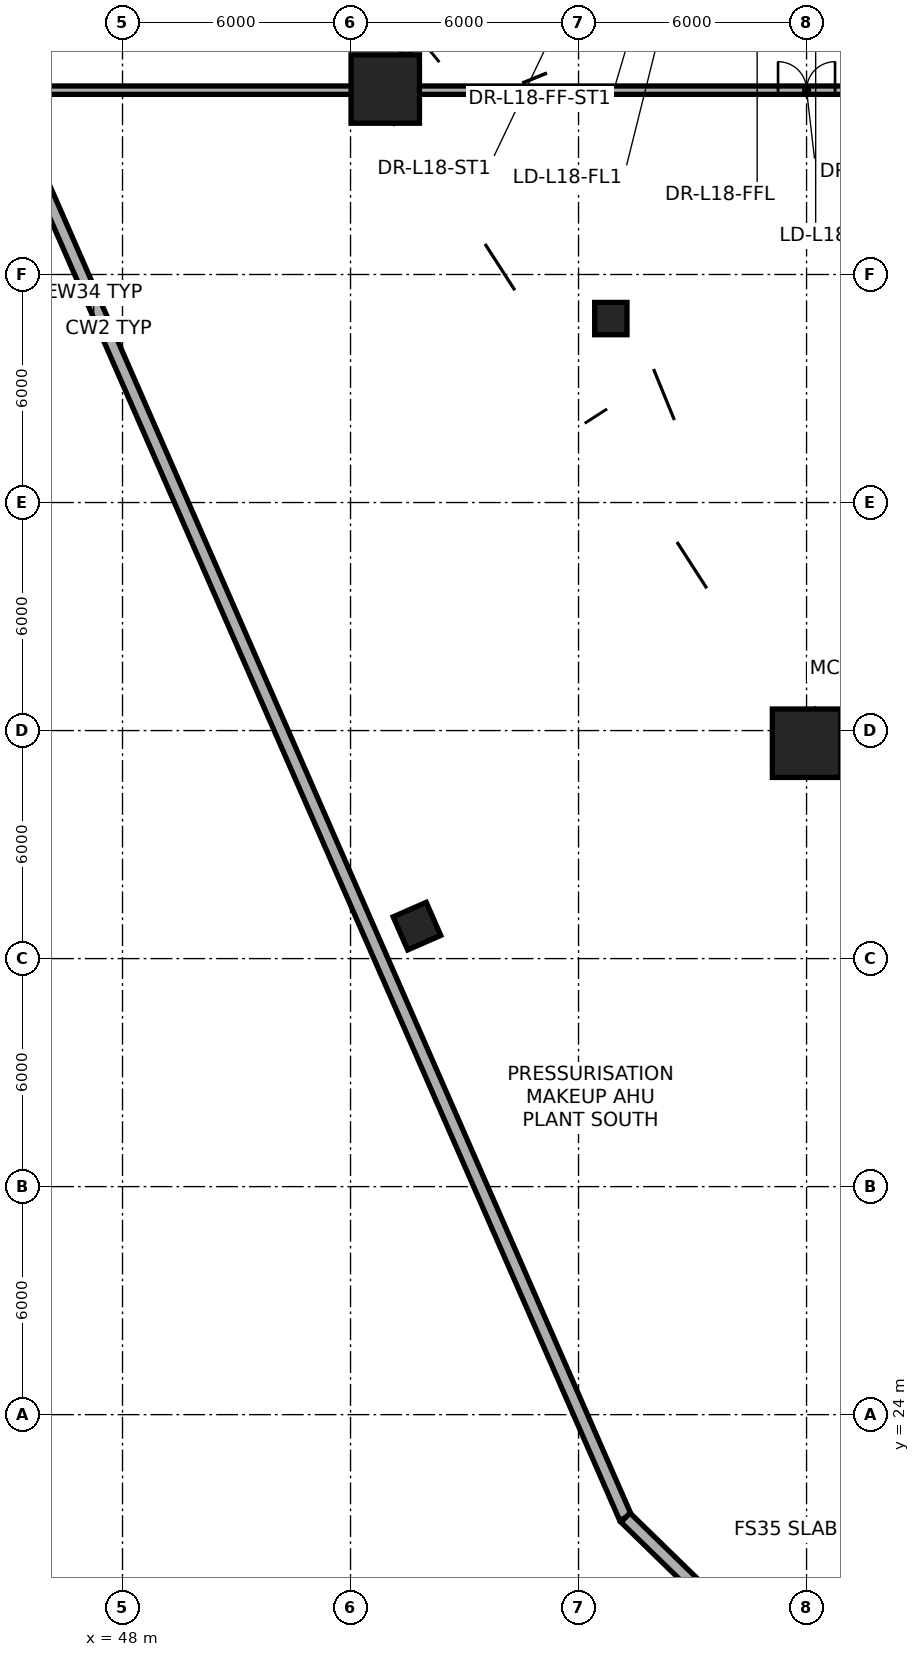
"""IFC4 building model, lengths in metres.
Left out: names, types, materials, properties, quantities, classifications, styles, units other than length and angle.
Written with IfcOpenShell. Run it as: python <this file> out.ifc"""

import sys

from ifc_helpers import new_model, si_unit, direction, frame, frame_2d, origin, origin_2d, place, context, subcontext, project, spatial, rectangle, extrude, element, fill, save


model = new_model("IFC4")
c1 = context("Model", 3, precision=1e-05, world=origin(), true_north=direction((0.0, 1.0)))
c2 = subcontext(c1, "Body", "Model", "MODEL_VIEW")
j1 = project(units=[si_unit("LENGTHUNIT", "METRE"), si_unit("PLANEANGLEUNIT", "RADIAN")], contexts=[c1])
p1 = place(None, origin())
s1 = spatial("IfcSite", under=j1, at=p1, CompositionType="ELEMENT")
p2 = place(p1, origin())
s2 = spatial("IfcBuilding", under=s1, at=p2, CompositionType="ELEMENT")
p3 = place(p2, frame((0.0, 0.0, 70.8)))
s3 = spatial("IfcBuildingStorey", under=s2, at=p3, CompositionType="ELEMENT", Elevation=70.8)
p4 = place(p3, frame((60.85, 52.84, 0.0), z_axis=(0.0, 0.0, 1.0), x_axis=(1.0, 0.0, 0.0)))
e1 = element("IfcColumn", 1, at=p4, inside=s3, PredefinedType="COLUMN", context=c2, shape_type="SweptSolid", body=[
    extrude(rectangle(XDim=0.85, YDim=0.85, at=origin_2d()), origin(), (0.0, 0.0, 1.0), 4.2),
])
for number, where, z_axis, x_axis in (
    (2, (66.0, 41.667, 0.0), (0.0, 0.0, 1.0), (1.0, 0.0, 0.0)),
    (3, (54.914, 58.88, 0.0), (0.0, 0.0, 1.0), (1.0, 0.0, 0.0)),
):
    element("IfcColumn", number, at=place(p3, frame(where, z_axis=z_axis, x_axis=x_axis)), inside=s3, PredefinedType="COLUMN", context=c2, shape_type="SweptSolid", body=[
        extrude(rectangle(XDim=1.8, YDim=1.8, at=origin_2d()), origin(), (0.0, 0.0, 1.0), 4.2),
    ])
p5 = place(p3, frame((55.726, 36.755, 0.003), z_axis=(0.010756270952, 0.047327592189, 0.998821506403), x_axis=(-0.18806176199, 0.981150159002, -0.04446503309)))
e4 = element("IfcColumn", 4, at=p5, inside=s3, PredefinedType="COLUMN", context=c2, shape_type="SweptSolid", body=[
    extrude(rectangle(XDim=0.95, YDim=0.95, at=origin_2d()), origin(), (0.0, 0.0, 1.0), 4.199),
])
p6 = place(p3, frame((61.236, 21.291, 0.0), z_axis=(0.0, 0.0, 1.0), x_axis=(-0.400832536075, 0.916151340131, 0.0)))
e5 = element("IfcWall", 5, at=p6, inside=s3, PredefinedType="STANDARD", context=c2, shape_type="SweptSolid", body=[
    extrude(rectangle(XDim=68.233, YDim=0.34, at=frame_2d((34.117, 0.0))), origin(), (0.0, 0.0, 1.0), 0.85),
])
p7 = place(p3, frame((64.042, 18.558, 0.0), z_axis=(0.0, 0.0, 1.0), x_axis=(-0.716333433886, 0.69775813252, 0.0)))
e6 = element("IfcWall", 6, at=p7, inside=s3, PredefinedType="STANDARD", context=c2, shape_type="SweptSolid", body=[
    extrude(rectangle(XDim=3.917, YDim=0.34, at=frame_2d((1.958, 0.0))), origin(), (0.0, 0.0, 1.0), 3.925),
])
p8 = place(p3, frame((44.896, 58.85, 0.0), z_axis=(0.0, 0.0, 1.0), x_axis=(1.0, 0.0, 0.0)))
e7 = element("IfcWall", 7, at=p8, inside=s3, PredefinedType="PARTITIONING", context=c2, shape_type="SweptSolid", body=[
    extrude(rectangle(XDim=10.554, YDim=0.22, at=frame_2d((5.277, 0.0))), origin(), (0.0, 0.0, 1.0), 3.055),
])
p9 = place(p3, frame((55.45, 58.85, 0.0), z_axis=(0.0, 0.0, 1.0), x_axis=(1.0, 0.0, 0.0)))
e8 = element("IfcWall", 8, at=p9, inside=s3, PredefinedType="PARTITIONING", context=c2, shape_type="SweptSolid", body=[
    extrude(rectangle(XDim=21.1, YDim=0.22, at=frame_2d((10.55, 0.0))), origin(), (0.0, 0.0, 1.0), 3.205),
])
p10 = place(p9, frame((9.8, 0.0, 0.0)))
e9 = element("IfcOpeningElement", 9, at=p10, cuts=e8, PredefinedType="OPENING", context=c2, shape_type="SweptSolid", body=[
    extrude(rectangle(XDim=1.5, YDim=2.2, at=frame_2d((0.75, 1.1))), frame((0.0, 0.12, 0.0), z_axis=(0.0, -1.0, 0.0), x_axis=(1.0, 0.0, 0.0)), (0.0, 0.0, 1.0), 0.24),
])
p11 = place(p3, frame((55.45, 58.85, 0.0), z_axis=(0.0, 0.0, 1.0), x_axis=(0.0, 1.0, 0.0)))
e10 = element("IfcWall", 10, at=p11, inside=s3, PredefinedType="PARTITIONING", context=c2, shape_type="SweptSolid", body=[
    extrude(rectangle(XDim=18.3, YDim=0.22, at=frame_2d((9.15, 0.0))), origin(), (0.0, 0.0, 1.0), 3.205),
])
p12 = place(p11, frame((8.321, 0.0, 0.0)))
e11 = element("IfcOpeningElement", 11, at=p12, cuts=e10, PredefinedType="OPENING", context=c2, shape_type="SweptSolid", body=[
    extrude(rectangle(XDim=1.05, YDim=2.15, at=frame_2d((0.525, 1.075))), frame((0.0, 0.12, 0.0), z_axis=(0.0, -1.0, 0.0), x_axis=(1.0, 0.0, 0.0)), (0.0, 0.0, 1.0), 0.24),
])
p13 = place(p11, frame((14.3, 0.0, 0.0)))
e12 = element("IfcOpeningElement", 12, at=p13, cuts=e10, PredefinedType="OPENING", context=c2, shape_type="SweptSolid", body=[
    extrude(rectangle(XDim=1.05, YDim=2.15, at=frame_2d((0.525, 1.075))), frame((0.0, 0.12, 0.0), z_axis=(0.0, -1.0, 0.0), x_axis=(1.0, 0.0, 0.0)), (0.0, 0.0, 1.0), 0.24),
])
p14 = place(p10, origin())
e13 = element("IfcDoor", 13, at=p14, inside=s3, OperationType="DOUBLE_DOOR_SINGLE_SWING", PredefinedType="DOOR", context=c2, shape_type="SweptSolid", body=[
    extrude(rectangle(XDim=1.5, YDim=2.2, at=frame_2d((0.75, 1.1))), frame((0.0, 0.025, 0.0), z_axis=(0.0, -1.0, 0.0), x_axis=(1.0, 0.0, 0.0)), (0.0, 0.0, 1.0), 0.05),
])
fill(e9, e13)
save(model, sys.argv[1])
